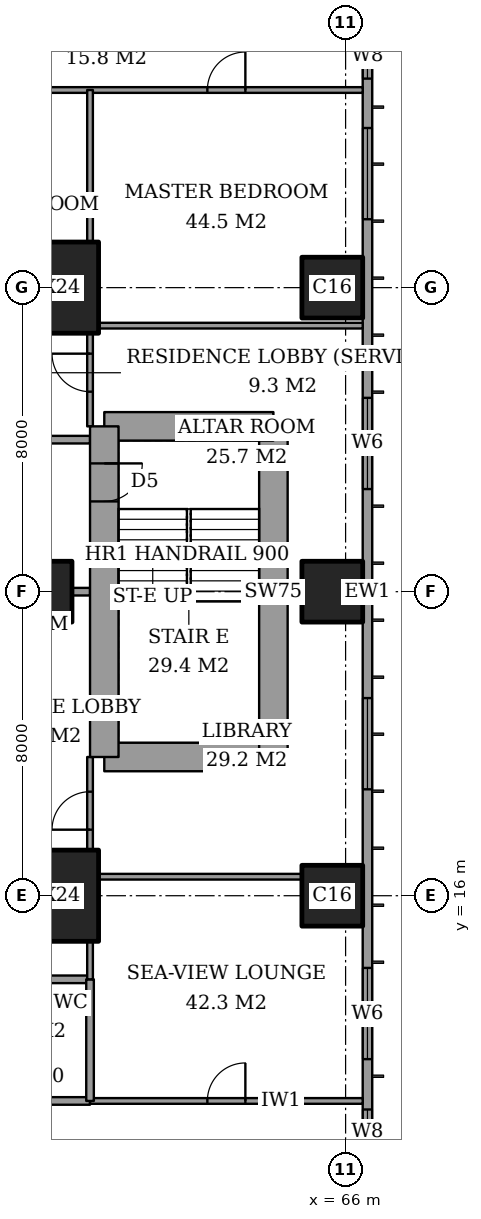
"""IFC4 building model, lengths in metres.
Left out: names, types, materials, properties, quantities, classifications, styles, units other than length and angle.
Written with IfcOpenShell. Run it as: python <this file> out.ifc"""

import sys

from ifc_helpers import new_model, si_unit, direction, frame, frame_2d, origin, origin_2d, place, context, subcontext, project, spatial, rectangle, extrude, element, fill, save


model = new_model("IFC4")
c1 = context("Model", 3, precision=1e-05, world=origin(), true_north=direction((0.0, 1.0)))
c2 = subcontext(c1, "Body", "Model", "MODEL_VIEW")
j1 = project(units=[si_unit("LENGTHUNIT", "METRE"), si_unit("PLANEANGLEUNIT", "RADIAN")], contexts=[c1])
p1 = place(None, origin())
s1 = spatial("IfcSite", under=j1, at=p1, CompositionType="ELEMENT")
p2 = place(p1, origin())
s2 = spatial("IfcBuilding", under=s1, at=p2, CompositionType="ELEMENT")
p3 = place(p2, frame((0.0, 0.0, 262.8)))
s3 = spatial("IfcBuildingStorey", under=s2, at=p3, CompositionType="ELEMENT", Elevation=262.8)
p4 = place(p3, frame((58.0, 16.0, 0.0), z_axis=(0.0, 0.0, 1.0), x_axis=(1.0, 0.0, 0.0)))
e1 = element("IfcColumn", 1, at=p4, inside=s3, PredefinedType="COLUMN", context=c2, shape_type="SweptSolid", body=[
    extrude(rectangle(XDim=3.0, YDim=2.4, at=origin_2d()), origin(), (0.0, 0.0, 1.0), 3.6),
])
p5 = place(p3, frame((58.0, 24.0, 0.0), z_axis=(0.0, 0.0, 1.0), x_axis=(1.0, 0.0, 0.0)))
e2 = element("IfcColumn", 2, at=p5, inside=s3, PredefinedType="COLUMN", context=c2, shape_type="SweptSolid", body=[
    extrude(rectangle(XDim=1.6, YDim=1.6, at=origin_2d()), origin(), (0.0, 0.0, 1.0), 3.6),
])
p6 = place(p3, frame((58.0, 32.0, 0.0), z_axis=(0.0, 0.0, 1.0), x_axis=(1.0, 0.0, 0.0)))
e3 = element("IfcColumn", 3, at=p6, inside=s3, PredefinedType="COLUMN", context=c2, shape_type="SweptSolid", body=[
    extrude(rectangle(XDim=3.0, YDim=2.4, at=origin_2d()), origin(), (0.0, 0.0, 1.0), 3.6),
])
for number, where, z_axis, x_axis in (
    (4, (65.65, 16.0, 0.0), (0.0, 0.0, 1.0), (1.0, 0.0, 0.0)),
    (5, (65.65, 24.0, 0.0), (0.0, 0.0, 1.0), (1.0, 0.0, 0.0)),
    (6, (65.65, 32.0, 0.0), (0.0, 0.0, 1.0), (1.0, 0.0, 0.0)),
):
    element("IfcColumn", number, at=place(p3, frame(where, z_axis=z_axis, x_axis=x_axis)), inside=s3, PredefinedType="COLUMN", context=c2, shape_type="SweptSolid", body=[
        extrude(rectangle(XDim=1.6, YDim=1.6, at=origin_2d()), origin(), (0.0, 0.0, 1.0), 3.6),
    ])
p7 = place(p3, frame((59.65, 19.65, 0.0), z_axis=(0.0, 0.0, 1.0), x_axis=(1.0, 0.0, 0.0)))
e7 = element("IfcWall", 7, at=p7, inside=s3, PredefinedType="SHEAR", context=c2, shape_type="SweptSolid", body=[
    extrude(rectangle(XDim=4.45, YDim=0.75, at=frame_2d((2.225, 0.0))), origin(), (0.0, 0.0, 1.0), 3.6),
])
p8 = place(p3, frame((64.1, 19.65, 0.0), z_axis=(0.0, 0.0, 1.0), x_axis=(0.0, 1.0, 0.0)))
e8 = element("IfcWall", 8, at=p8, inside=s3, PredefinedType="SHEAR", context=c2, shape_type="SweptSolid", body=[
    extrude(rectangle(XDim=8.7, YDim=0.75, at=frame_2d((4.35, 0.0))), origin(), (0.0, 0.0, 1.0), 3.6),
])
p9 = place(p3, frame((64.1, 28.35, 0.0), z_axis=(0.0, 0.0, 1.0), x_axis=(-1.0, 0.0, 0.0)))
e9 = element("IfcWall", 9, at=p9, inside=s3, PredefinedType="SHEAR", context=c2, shape_type="SweptSolid", body=[
    extrude(rectangle(XDim=4.45, YDim=0.75, at=frame_2d((2.225, 0.0))), origin(), (0.0, 0.0, 1.0), 3.6),
])
p10 = place(p3, frame((59.65, 28.35, 0.0), z_axis=(0.0, 0.0, 1.0), x_axis=(0.0, -1.0, 0.0)))
e10 = element("IfcWall", 10, at=p10, inside=s3, PredefinedType="SHEAR", context=c2, shape_type="SweptSolid", body=[
    extrude(rectangle(XDim=8.7, YDim=0.75, at=frame_2d((4.35, 0.0))), origin(), (0.0, 0.0, 1.0), 3.6),
])
p11 = place(p10, frame((0.975, 0.0, 0.0)))
e11 = element("IfcOpeningElement", 11, at=p11, cuts=e10, PredefinedType="OPENING", context=c2, shape_type="SweptSolid", body=[
    extrude(rectangle(XDim=1.0, YDim=2.1, at=frame_2d((0.5, 1.05))), frame((0.0, 0.385, 0.0), z_axis=(0.0, -1.0, 0.0), x_axis=(1.0, 0.0, 0.0)), (0.0, 0.0, 1.0), 0.77),
])
p12 = place(p3, frame((66.575, 3.175, 0.0), z_axis=(0.0, 0.0, 1.0), x_axis=(0.0, 1.0, 0.0)))
e12 = element("IfcWall", 12, at=p12, inside=s3, PredefinedType="SOLIDWALL", context=c2, shape_type="SweptSolid", body=[
    extrude(rectangle(XDim=41.65, YDim=0.25, at=frame_2d((20.825, 0.0))), origin(), (0.0, 0.0, 1.0), 3.6),
])
p13 = place(p12, frame((0.875, 0.0, 0.6)))
e13 = element("IfcOpeningElement", 13, at=p13, cuts=e12, PredefinedType="OPENING", context=c2, shape_type="SweptSolid", body=[
    extrude(rectangle(XDim=2.4, YDim=2.0, at=frame_2d((1.2, 1.0))), frame((0.0, 0.135, 0.0), z_axis=(0.0, -1.0, 0.0), x_axis=(1.0, 0.0, 0.0)), (0.0, 0.0, 1.0), 0.27),
])
p14 = place(p12, frame((6.0, 0.0, 0.6)))
e14 = element("IfcOpeningElement", 14, at=p14, cuts=e12, PredefinedType="OPENING", context=c2, shape_type="SweptSolid", body=[
    extrude(rectangle(XDim=1.2, YDim=2.0, at=frame_2d((0.6, 1.0))), frame((0.0, 0.135, 0.0), z_axis=(0.0, -1.0, 0.0), x_axis=(1.0, 0.0, 0.0)), (0.0, 0.0, 1.0), 0.27),
])
p15 = place(p12, frame((8.525, 0.0, 0.6)))
e15 = element("IfcOpeningElement", 15, at=p15, cuts=e12, PredefinedType="OPENING", context=c2, shape_type="SweptSolid", body=[
    extrude(rectangle(XDim=2.4, YDim=2.0, at=frame_2d((1.2, 1.0))), frame((0.0, 0.135, 0.0), z_axis=(0.0, -1.0, 0.0), x_axis=(1.0, 0.0, 0.0)), (0.0, 0.0, 1.0), 0.27),
])
p16 = place(p12, frame((15.625, 0.0, 0.6)))
e16 = element("IfcOpeningElement", 16, at=p16, cuts=e12, PredefinedType="OPENING", context=c2, shape_type="SweptSolid", body=[
    extrude(rectangle(XDim=2.4, YDim=2.0, at=frame_2d((1.2, 1.0))), frame((0.0, 0.135, 0.0), z_axis=(0.0, -1.0, 0.0), x_axis=(1.0, 0.0, 0.0)), (0.0, 0.0, 1.0), 0.27),
])
p17 = place(p12, frame((23.525, 0.0, 0.6)))
e17 = element("IfcOpeningElement", 17, at=p17, cuts=e12, PredefinedType="OPENING", context=c2, shape_type="SweptSolid", body=[
    extrude(rectangle(XDim=2.4, YDim=2.0, at=frame_2d((1.2, 1.0))), frame((0.0, 0.135, 0.0), z_axis=(0.0, -1.0, 0.0), x_axis=(1.0, 0.0, 0.0)), (0.0, 0.0, 1.0), 0.27),
])
p18 = place(p12, frame((30.625, 0.0, 0.6)))
e18 = element("IfcOpeningElement", 18, at=p18, cuts=e12, PredefinedType="OPENING", context=c2, shape_type="SweptSolid", body=[
    extrude(rectangle(XDim=2.4, YDim=2.0, at=frame_2d((1.2, 1.0))), frame((0.0, 0.135, 0.0), z_axis=(0.0, -1.0, 0.0), x_axis=(1.0, 0.0, 0.0)), (0.0, 0.0, 1.0), 0.27),
])
p19 = place(p12, frame((34.325, 0.0, 0.6)))
e19 = element("IfcOpeningElement", 19, at=p19, cuts=e12, PredefinedType="OPENING", context=c2, shape_type="SweptSolid", body=[
    extrude(rectangle(XDim=1.2, YDim=2.0, at=frame_2d((0.6, 1.0))), frame((0.0, 0.135, 0.0), z_axis=(0.0, -1.0, 0.0), x_axis=(1.0, 0.0, 0.0)), (0.0, 0.0, 1.0), 0.27),
])
p20 = place(p12, frame((38.375, 0.0, 0.6)))
e20 = element("IfcOpeningElement", 20, at=p20, cuts=e12, PredefinedType="OPENING", context=c2, shape_type="SweptSolid", body=[
    extrude(rectangle(XDim=2.4, YDim=2.0, at=frame_2d((1.2, 1.0))), frame((0.0, 0.135, 0.0), z_axis=(0.0, -1.0, 0.0), x_axis=(1.0, 0.0, 0.0)), (0.0, 0.0, 1.0), 0.27),
])
p21 = place(p3, frame((56.2, 10.6, 0.0), z_axis=(0.0, 0.0, 1.0), x_axis=(1.0, 0.0, 0.0)))
e21 = element("IfcWall", 21, at=p21, inside=s3, PredefinedType="PARTITIONING", context=c2, shape_type="SweptSolid", body=[
    extrude(rectangle(XDim=3.075, YDim=0.2, at=frame_2d((1.538, 0.0))), origin(), (0.0, 0.0, 1.0), 3.35),
])
p22 = place(p21, frame((1.087, 0.0, 0.0)))
e22 = element("IfcOpeningElement", 22, at=p22, cuts=e21, PredefinedType="OPENING", context=c2, shape_type="SweptSolid", body=[
    extrude(rectangle(XDim=0.9, YDim=2.1, at=frame_2d((0.45, 1.05))), frame((0.0, 0.11, 0.0), z_axis=(0.0, -1.0, 0.0), x_axis=(1.0, 0.0, 0.0)), (0.0, 0.0, 1.0), 0.22),
])
p23 = place(p3, frame((59.275, 10.6, 0.0), z_axis=(0.0, 0.0, 1.0), x_axis=(1.0, 0.0, 0.0)))
e23 = element("IfcWall", 23, at=p23, inside=s3, PredefinedType="PARTITIONING", context=c2, shape_type="SweptSolid", body=[
    extrude(rectangle(XDim=7.175, YDim=0.15, at=frame_2d((3.587, 0.0))), origin(), (0.0, 0.0, 1.0), 3.35),
])
p24 = place(p23, frame((3.087, 0.0, 0.0)))
e24 = element("IfcOpeningElement", 24, at=p24, cuts=e23, PredefinedType="OPENING", context=c2, shape_type="SweptSolid", body=[
    extrude(rectangle(XDim=1.0, YDim=2.1, at=frame_2d((0.5, 1.05))), frame((0.0, 0.085, 0.0), z_axis=(0.0, -1.0, 0.0), x_axis=(1.0, 0.0, 0.0)), (0.0, 0.0, 1.0), 0.17),
])
p25 = place(p3, frame((56.2, 13.8, 0.0), z_axis=(0.0, 0.0, 1.0), x_axis=(1.0, 0.0, 0.0)))
e25 = element("IfcWall", 25, at=p25, inside=s3, PredefinedType="PARTITIONING", context=c2, shape_type="SweptSolid", body=[
    extrude(rectangle(XDim=3.075, YDim=0.2, at=frame_2d((1.538, 0.0))), origin(), (0.0, 0.0, 1.0), 3.35),
])
p26 = place(p3, frame((59.5, 16.5, 0.0), z_axis=(0.0, 0.0, 1.0), x_axis=(1.0, 0.0, 0.0)))
e26 = element("IfcWall", 26, at=p26, inside=s3, PredefinedType="PARTITIONING", context=c2, shape_type="SweptSolid", body=[
    extrude(rectangle(XDim=5.35, YDim=0.15, at=frame_2d((2.675, 0.0))), origin(), (0.0, 0.0, 1.0), 3.35),
])
p27 = place(p3, frame((58.8, 24.0, 0.0), z_axis=(0.0, 0.0, 1.0), x_axis=(1.0, 0.0, 0.0)))
e27 = element("IfcWall", 27, at=p27, inside=s3, PredefinedType="PARTITIONING", context=c2, shape_type="SweptSolid", body=[
    extrude(rectangle(XDim=0.475, YDim=0.2, at=frame_2d((0.237, 0.0))), origin(), (0.0, 0.0, 1.0), 3.35),
])
p28 = place(p3, frame((64.475, 24.0, 0.0), z_axis=(0.0, 0.0, 1.0), x_axis=(1.0, 0.0, 0.0)))
e28 = element("IfcWall", 28, at=p28, inside=s3, PredefinedType="PARTITIONING", context=c2, shape_type="SweptSolid", body=[
    extrude(rectangle(XDim=0.375, YDim=0.15, at=frame_2d((0.188, 0.0))), origin(), (0.0, 0.0, 1.0), 3.35),
])
p29 = place(p3, frame((42.0, 28.0, 0.0), z_axis=(0.0, 0.0, 1.0), x_axis=(1.0, 0.0, 0.0)))
e29 = element("IfcWall", 29, at=p29, inside=s3, PredefinedType="PARTITIONING", context=c2, shape_type="SweptSolid", body=[
    extrude(rectangle(XDim=17.275, YDim=0.2, at=frame_2d((8.637, 0.0))), origin(), (0.0, 0.0, 1.0), 3.35),
])
p30 = place(p29, frame((9.4, 0.0, 0.0)))
e30 = element("IfcOpeningElement", 30, at=p30, cuts=e29, PredefinedType="OPENING", context=c2, shape_type="SweptSolid", body=[
    extrude(rectangle(XDim=1.2, YDim=2.4, at=frame_2d((0.6, 1.2))), frame((0.0, 0.11, 0.0), z_axis=(0.0, -1.0, 0.0), x_axis=(1.0, 0.0, 0.0)), (0.0, 0.0, 1.0), 0.22),
])
p31 = place(p3, frame((59.5, 31.0, 0.0), z_axis=(0.0, 0.0, 1.0), x_axis=(1.0, 0.0, 0.0)))
e31 = element("IfcWall", 31, at=p31, inside=s3, PredefinedType="PARTITIONING", context=c2, shape_type="SweptSolid", body=[
    extrude(rectangle(XDim=6.95, YDim=0.15, at=frame_2d((3.475, 0.0))), origin(), (0.0, 0.0, 1.0), 3.35),
])
p32 = place(p3, frame((41.439, 37.2, 0.0), z_axis=(0.0, 0.0, 1.0), x_axis=(1.0, 0.0, 0.0)))
e32 = element("IfcWall", 32, at=p32, inside=s3, PredefinedType="PARTITIONING", context=c2, shape_type="SweptSolid", body=[
    extrude(rectangle(XDim=25.011, YDim=0.15, at=frame_2d((12.505, 0.0))), origin(), (0.0, 0.0, 1.0), 3.35),
])
p33 = place(p32, frame((10.761, 0.0, 0.0)))
e33 = element("IfcOpeningElement", 33, at=p33, cuts=e32, PredefinedType="OPENING", context=c2, shape_type="SweptSolid", body=[
    extrude(rectangle(XDim=1.0, YDim=2.1, at=frame_2d((0.5, 1.05))), frame((0.0, 0.085, 0.0), z_axis=(0.0, -1.0, 0.0), x_axis=(1.0, 0.0, 0.0)), (0.0, 0.0, 1.0), 0.17),
])
p34 = place(p32, frame((20.924, 0.0, 0.0)))
e34 = element("IfcOpeningElement", 34, at=p34, cuts=e32, PredefinedType="OPENING", context=c2, shape_type="SweptSolid", body=[
    extrude(rectangle(XDim=1.0, YDim=2.1, at=frame_2d((0.5, 1.05))), frame((0.0, 0.085, 0.0), z_axis=(0.0, -1.0, 0.0), x_axis=(1.0, 0.0, 0.0)), (0.0, 0.0, 1.0), 0.17),
])
p35 = place(p32, frame((15.749, 0.0, 0.0)))
e35 = element("IfcOpeningElement", 35, at=p35, cuts=e32, PredefinedType="OPENING", context=c2, shape_type="SweptSolid", body=[
    extrude(rectangle(XDim=0.9, YDim=2.1, at=frame_2d((0.45, 1.05))), frame((0.0, 0.085, 0.0), z_axis=(0.0, -1.0, 0.0), x_axis=(1.0, 0.0, 0.0)), (0.0, 0.0, 1.0), 0.17),
])
p36 = place(p32, frame((12.961, 0.0, 0.0)))
e36 = element("IfcOpeningElement", 36, at=p36, cuts=e32, PredefinedType="OPENING", context=c2, shape_type="SweptSolid", body=[
    extrude(rectangle(XDim=1.0, YDim=2.1, at=frame_2d((0.5, 1.05))), frame((0.0, 0.085, 0.0), z_axis=(0.0, -1.0, 0.0), x_axis=(1.0, 0.0, 0.0)), (0.0, 0.0, 1.0), 0.17),
])
p37 = place(p32, frame((7.911, 0.0, 0.0)))
e37 = element("IfcOpeningElement", 37, at=p37, cuts=e32, PredefinedType="OPENING", context=c2, shape_type="SweptSolid", body=[
    extrude(rectangle(XDim=0.9, YDim=2.1, at=frame_2d((0.45, 1.05))), frame((0.0, 0.085, 0.0), z_axis=(0.0, -1.0, 0.0), x_axis=(1.0, 0.0, 0.0)), (0.0, 0.0, 1.0), 0.17),
])
p38 = place(p32, frame((2.836, 0.0, 0.0)))
e38 = element("IfcOpeningElement", 38, at=p38, cuts=e32, PredefinedType="OPENING", context=c2, shape_type="SweptSolid", body=[
    extrude(rectangle(XDim=1.0, YDim=2.1, at=frame_2d((0.5, 1.05))), frame((0.0, 0.085, 0.0), z_axis=(0.0, -1.0, 0.0), x_axis=(1.0, 0.0, 0.0)), (0.0, 0.0, 1.0), 0.17),
])
p39 = place(p3, frame((59.275, 10.6, 0.0), z_axis=(0.0, 0.0, 1.0), x_axis=(0.0, 1.0, 0.0)))
e39 = element("IfcWall", 39, at=p39, inside=s3, PredefinedType="PARTITIONING", context=c2, shape_type="SweptSolid", body=[
    extrude(rectangle(XDim=3.2, YDim=0.2, at=frame_2d((1.6, 0.0))), origin(), (0.0, 0.0, 1.0), 3.35),
])
p40 = place(p3, frame((59.275, 13.8, 0.0), z_axis=(0.0, 0.0, 1.0), x_axis=(0.0, 1.0, 0.0)))
e40 = element("IfcWall", 40, at=p40, inside=s3, PredefinedType="PARTITIONING", context=c2, shape_type="SweptSolid", body=[
    extrude(rectangle(XDim=1.0, YDim=0.15, at=frame_2d((0.5, 0.0))), origin(), (0.0, 0.0, 1.0), 3.35),
])
p41 = place(p3, frame((59.275, 17.2, 0.0), z_axis=(0.0, 0.0, 1.0), x_axis=(0.0, 1.0, 0.0)))
e41 = element("IfcWall", 41, at=p41, inside=s3, PredefinedType="PARTITIONING", context=c2, shape_type="SweptSolid", body=[
    extrude(rectangle(XDim=2.45, YDim=0.15, at=frame_2d((1.225, 0.0))), origin(), (0.0, 0.0, 1.0), 3.35),
])
p42 = place(p41, frame((0.538, 0.0, 0.0)))
e42 = element("IfcOpeningElement", 42, at=p42, cuts=e41, PredefinedType="OPENING", context=c2, shape_type="SweptSolid", body=[
    extrude(rectangle(XDim=1.0, YDim=2.1, at=frame_2d((0.5, 1.05))), frame((0.0, 0.085, 0.0), z_axis=(0.0, -1.0, 0.0), x_axis=(1.0, 0.0, 0.0)), (0.0, 0.0, 1.0), 0.17),
])
p43 = place(p3, frame((59.275, 28.35, 0.0), z_axis=(0.0, 0.0, 1.0), x_axis=(0.0, 1.0, 0.0)))
e43 = element("IfcWall", 43, at=p43, inside=s3, PredefinedType="PARTITIONING", context=c2, shape_type="SweptSolid", body=[
    extrude(rectangle(XDim=2.45, YDim=0.15, at=frame_2d((1.225, 0.0))), origin(), (0.0, 0.0, 1.0), 3.35),
])
p44 = place(p43, frame((0.913, 0.0, 0.0)))
e44 = element("IfcOpeningElement", 44, at=p44, cuts=e43, PredefinedType="OPENING", context=c2, shape_type="SweptSolid", body=[
    extrude(rectangle(XDim=1.0, YDim=2.1, at=frame_2d((0.5, 1.05))), frame((0.0, 0.085, 0.0), z_axis=(0.0, -1.0, 0.0), x_axis=(1.0, 0.0, 0.0)), (0.0, 0.0, 1.0), 0.17),
])
p45 = place(p3, frame((59.275, 33.2, 0.0), z_axis=(0.0, 0.0, 1.0), x_axis=(0.0, 1.0, 0.0)))
e45 = element("IfcWall", 45, at=p45, inside=s3, PredefinedType="PARTITIONING", context=c2, shape_type="SweptSolid", body=[
    extrude(rectangle(XDim=4.0, YDim=0.15, at=frame_2d((2.0, 0.0))), origin(), (0.0, 0.0, 1.0), 3.35),
])
p46 = place(p14, origin())
e46 = element("IfcWindow", 46, at=p46, inside=s3, PartitioningType="SINGLE_PANEL", PredefinedType="WINDOW", context=c2, shape_type="SweptSolid", body=[
    extrude(rectangle(XDim=1.2, YDim=2.0, at=frame_2d((0.6, 1.0))), frame((0.0, 0.03, 0.0), z_axis=(0.0, -1.0, 0.0), x_axis=(1.0, 0.0, 0.0)), (0.0, 0.0, 1.0), 0.06),
])
fill(e14, e46)
p47 = place(p15, origin())
e47 = element("IfcWindow", 47, at=p47, inside=s3, PartitioningType="SINGLE_PANEL", PredefinedType="WINDOW", context=c2, shape_type="SweptSolid", body=[
    extrude(rectangle(XDim=2.4, YDim=2.0, at=frame_2d((1.2, 1.0))), frame((0.0, 0.03, 0.0), z_axis=(0.0, -1.0, 0.0), x_axis=(1.0, 0.0, 0.0)), (0.0, 0.0, 1.0), 0.06),
])
fill(e15, e47)
p48 = place(p16, origin())
e48 = element("IfcWindow", 48, at=p48, inside=s3, PartitioningType="SINGLE_PANEL", PredefinedType="WINDOW", context=c2, shape_type="SweptSolid", body=[
    extrude(rectangle(XDim=2.4, YDim=2.0, at=frame_2d((1.2, 1.0))), frame((0.0, 0.03, 0.0), z_axis=(0.0, -1.0, 0.0), x_axis=(1.0, 0.0, 0.0)), (0.0, 0.0, 1.0), 0.06),
])
fill(e16, e48)
p49 = place(p17, origin())
e49 = element("IfcWindow", 49, at=p49, inside=s3, PartitioningType="SINGLE_PANEL", PredefinedType="WINDOW", context=c2, shape_type="SweptSolid", body=[
    extrude(rectangle(XDim=2.4, YDim=2.0, at=frame_2d((1.2, 1.0))), frame((0.0, 0.03, 0.0), z_axis=(0.0, -1.0, 0.0), x_axis=(1.0, 0.0, 0.0)), (0.0, 0.0, 1.0), 0.06),
])
fill(e17, e49)
p50 = place(p18, origin())
e50 = element("IfcWindow", 50, at=p50, inside=s3, PartitioningType="SINGLE_PANEL", PredefinedType="WINDOW", context=c2, shape_type="SweptSolid", body=[
    extrude(rectangle(XDim=2.4, YDim=2.0, at=frame_2d((1.2, 1.0))), frame((0.0, 0.03, 0.0), z_axis=(0.0, -1.0, 0.0), x_axis=(1.0, 0.0, 0.0)), (0.0, 0.0, 1.0), 0.06),
])
fill(e18, e50)
p51 = place(p19, origin())
e51 = element("IfcWindow", 51, at=p51, inside=s3, PartitioningType="SINGLE_PANEL", PredefinedType="WINDOW", context=c2, shape_type="SweptSolid", body=[
    extrude(rectangle(XDim=1.2, YDim=2.0, at=frame_2d((0.6, 1.0))), frame((0.0, 0.03, 0.0), z_axis=(0.0, -1.0, 0.0), x_axis=(1.0, 0.0, 0.0)), (0.0, 0.0, 1.0), 0.06),
])
fill(e19, e51)
p52 = place(p24, origin())
e52 = element("IfcDoor", 52, at=p52, inside=s3, OperationType="SINGLE_SWING_LEFT", PredefinedType="DOOR", context=c2, shape_type="SweptSolid", body=[
    extrude(rectangle(XDim=1.0, YDim=2.1, at=frame_2d((0.5, 1.05))), frame((0.0, 0.025, 0.0), z_axis=(0.0, -1.0, 0.0), x_axis=(1.0, 0.0, 0.0)), (0.0, 0.0, 1.0), 0.05),
])
fill(e24, e52)
p53 = place(p42, origin())
e53 = element("IfcDoor", 53, at=p53, inside=s3, OperationType="SINGLE_SWING_RIGHT", PredefinedType="DOOR", context=c2, shape_type="SweptSolid", body=[
    extrude(rectangle(XDim=1.0, YDim=2.1, at=frame_2d((0.5, 1.05))), frame((0.0, 0.025, 0.0), z_axis=(0.0, -1.0, 0.0), x_axis=(1.0, 0.0, 0.0)), (0.0, 0.0, 1.0), 0.05),
])
fill(e42, e53)
p54 = place(p34, origin())
e54 = element("IfcDoor", 54, at=p54, inside=s3, OperationType="SINGLE_SWING_LEFT", PredefinedType="DOOR", context=c2, shape_type="SweptSolid", body=[
    extrude(rectangle(XDim=1.0, YDim=2.1, at=frame_2d((0.5, 1.05))), frame((0.0, 0.025, 0.0), z_axis=(0.0, -1.0, 0.0), x_axis=(1.0, 0.0, 0.0)), (0.0, 0.0, 1.0), 0.05),
])
fill(e34, e54)
p55 = place(p44, origin())
e55 = element("IfcDoor", 55, at=p55, inside=s3, OperationType="SINGLE_SWING_LEFT", PredefinedType="DOOR", context=c2, shape_type="SweptSolid", body=[
    extrude(rectangle(XDim=1.0, YDim=2.1, at=frame_2d((0.5, 1.05))), frame((0.0, 0.025, 0.0), z_axis=(0.0, -1.0, 0.0), x_axis=(1.0, 0.0, 0.0)), (0.0, 0.0, 1.0), 0.05),
])
fill(e44, e55)
p56 = place(p11, origin())
e56 = element("IfcDoor", 56, at=p56, inside=s3, OperationType="SINGLE_SWING_RIGHT", PredefinedType="DOOR", context=c2, shape_type="SweptSolid", body=[
    extrude(rectangle(XDim=1.0, YDim=2.1, at=frame_2d((0.5, 1.05))), frame((0.0, 0.025, 0.0), z_axis=(0.0, -1.0, 0.0), x_axis=(1.0, 0.0, 0.0)), (0.0, 0.0, 1.0), 0.05),
])
fill(e11, e56)
save(model, sys.argv[1])
